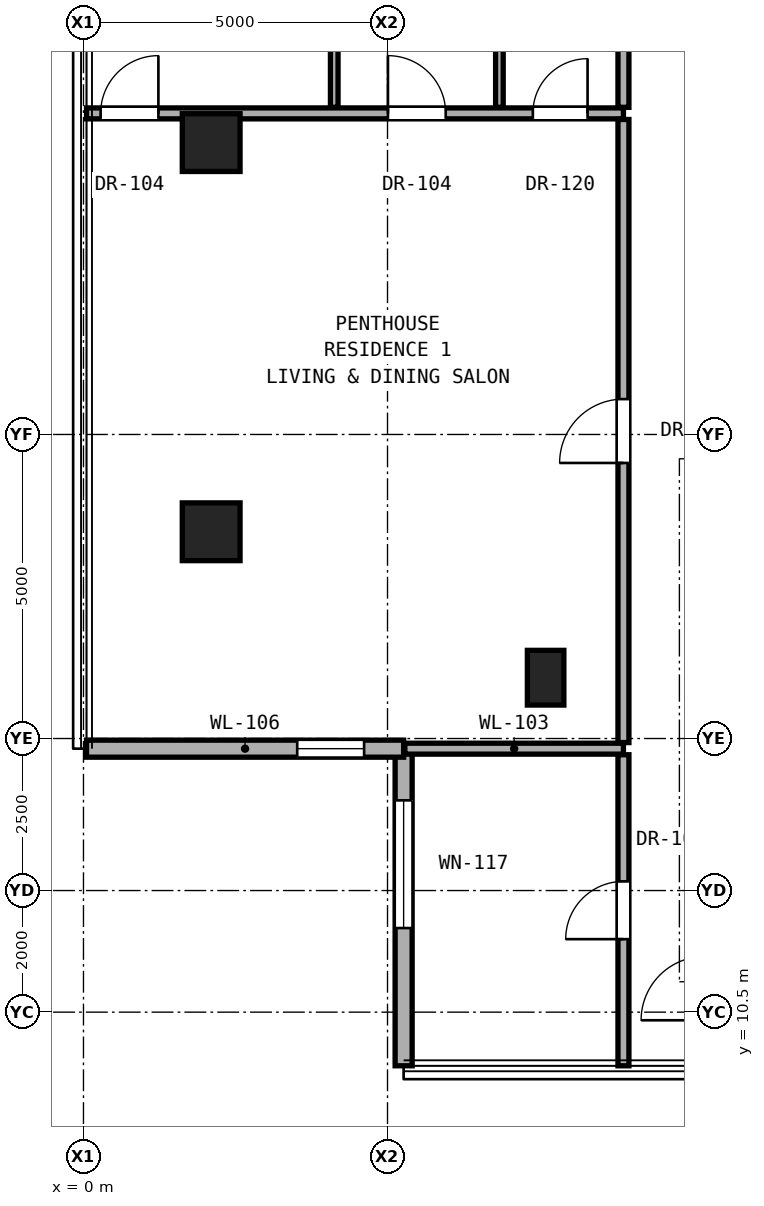
"""IFC4 building model, lengths in metres.
Left out: names, types, materials, properties, quantities, classifications, styles, units other than length and angle.
Written with IfcOpenShell. Run it as: python <this file> out.ifc"""

import sys

from ifc_helpers import new_model, si_unit, direction, frame, frame_2d, origin, origin_2d, place, context, subcontext, project, spatial, rectangle, hollow_rectangle, extrude, element, fill, save


model = new_model("IFC4")
c1 = context("Model", 3, precision=1e-05, world=origin(), true_north=direction((0.0, 1.0)))
c2 = subcontext(c1, "Body", "Model", "MODEL_VIEW")
j1 = project(units=[si_unit("LENGTHUNIT", "METRE"), si_unit("PLANEANGLEUNIT", "RADIAN")], contexts=[c1])
p1 = place(None, origin())
s1 = spatial("IfcSite", under=j1, at=p1, CompositionType="ELEMENT")
p2 = place(p1, origin())
s2 = spatial("IfcBuilding", under=s1, at=p2, CompositionType="ELEMENT")
p3 = place(p2, frame((0.0, 0.0, 196.65)))
s3 = spatial("IfcBuildingStorey", under=s2, at=p3, CompositionType="ELEMENT", Elevation=196.65)
for number, where, z_axis, x_axis in (
    (1, (2.1, 18.4, 0.0), (0.0, 0.0, 1.0), (1.0, 0.0, 0.0)),
    (2, (2.1, 24.8, 0.0), (0.0, 0.0, 1.0), (1.0, 0.0, 0.0)),
):
    element("IfcColumn", number, at=place(p3, frame(where, z_axis=z_axis, x_axis=x_axis)), inside=s3, PredefinedType="COLUMN", context=c2, shape_type="SweptSolid", body=[
        extrude(hollow_rectangle(XDim=0.95, YDim=0.95, WallThickness=0.05, at=origin_2d()), origin(), (0.0, 0.0, 1.0), 3.25),
    ])
p4 = place(p3, frame((7.6, 16.0, 0.0), z_axis=(0.0, 0.0, 1.0), x_axis=(1.0, 0.0, 0.0)))
e3 = element("IfcColumn", 3, at=p4, inside=s3, PredefinedType="PILASTER", context=c2, shape_type="SweptSolid", body=[
    extrude(rectangle(XDim=0.6, YDim=0.9, at=origin_2d()), origin(), (0.0, 0.0, 1.0), 3.25),
])
p5 = place(p3, frame((5.265, 14.833, 0.0), z_axis=(0.0, 0.0, 1.0), x_axis=(0.0, -1.0, 0.0)))
e4 = element("IfcWall", 4, at=p5, inside=s3, PredefinedType="SOLIDWALL", context=c2, shape_type="SweptSolid", body=[
    extrude(rectangle(XDim=5.215, YDim=0.28, at=frame_2d((2.607, 0.0))), origin(), (0.0, 0.0, 1.0), 3.03),
])
p6 = place(p5, frame((0.85, 0.0, 0.68)))
e5 = element("IfcOpeningElement", 5, at=p6, cuts=e4, PredefinedType="OPENING", context=c2, shape_type="SweptSolid", body=[
    extrude(rectangle(XDim=2.1, YDim=2.2, at=frame_2d((1.05, 1.1))), frame((0.0, 0.15, 0.0), z_axis=(0.0, -1.0, 0.0), x_axis=(1.0, 0.0, 0.0)), (0.0, 0.0, 1.0), 0.3),
])
p7 = place(p3, frame((0.05, 14.833, 0.0), z_axis=(0.0, 0.0, 1.0), x_axis=(1.0, 0.0, 0.0)))
e6 = element("IfcWall", 6, at=p7, inside=s3, PredefinedType="SOLIDWALL", context=c2, shape_type="SweptSolid", body=[
    extrude(rectangle(XDim=5.215, YDim=0.28, at=frame_2d((2.607, 0.0))), origin(), (0.0, 0.0, 1.0), 3.03),
])
p8 = place(p7, frame((3.465, 0.0, 0.85)))
e7 = element("IfcOpeningElement", 7, at=p8, cuts=e6, PredefinedType="OPENING", context=c2, shape_type="SweptSolid", body=[
    extrude(rectangle(XDim=1.1, YDim=2.0, at=frame_2d((0.55, 1.0))), frame((0.0, 0.15, 0.0), z_axis=(0.0, -1.0, 0.0), x_axis=(1.0, 0.0, 0.0)), (0.0, 0.0, 1.0), 0.3),
])
p9 = place(p3, frame((5.285, 14.833, 0.0), z_axis=(0.0, 0.0, 1.0), x_axis=(1.0, 0.0, 0.0)))
e8 = element("IfcWall", 8, at=p9, inside=s3, PredefinedType="PARTITIONING", context=c2, shape_type="SweptSolid", body=[
    extrude(rectangle(XDim=3.595, YDim=0.18, at=frame_2d((1.797, 0.0))), origin(), (0.0, 0.0, 1.0), 3.05),
])
p10 = place(p3, frame((0.05, 25.28, 0.0), z_axis=(0.0, 0.0, 1.0), x_axis=(1.0, 0.0, 0.0)))
e9 = element("IfcWall", 9, at=p10, inside=s3, PredefinedType="PARTITIONING", context=c2, shape_type="SweptSolid", body=[
    extrude(rectangle(XDim=8.83, YDim=0.18, at=frame_2d((4.415, 0.0))), origin(), (0.0, 0.0, 1.0), 2.269),
])
p11 = place(p10, frame((0.232, 0.0, 0.0)))
e10 = element("IfcOpeningElement", 10, at=p11, cuts=e9, PredefinedType="OPENING", context=c2, shape_type="SweptSolid", body=[
    extrude(rectangle(XDim=0.95, YDim=2.15, at=frame_2d((0.475, 1.075))), frame((0.0, 0.1, 0.0), z_axis=(0.0, -1.0, 0.0), x_axis=(1.0, 0.0, 0.0)), (0.0, 0.0, 1.0), 0.2),
])
p12 = place(p10, frame((4.957, 0.0, 0.0)))
e11 = element("IfcOpeningElement", 11, at=p12, cuts=e9, PredefinedType="OPENING", context=c2, shape_type="SweptSolid", body=[
    extrude(rectangle(XDim=0.95, YDim=2.15, at=frame_2d((0.475, 1.075))), frame((0.0, 0.1, 0.0), z_axis=(0.0, -1.0, 0.0), x_axis=(1.0, 0.0, 0.0)), (0.0, 0.0, 1.0), 0.2),
])
p13 = place(p10, frame((7.34, 0.0, 0.0)))
e12 = element("IfcOpeningElement", 12, at=p13, cuts=e9, PredefinedType="OPENING", context=c2, shape_type="SweptSolid", body=[
    extrude(rectangle(XDim=0.9, YDim=2.1, at=frame_2d((0.45, 1.05))), frame((0.0, 0.1, 0.0), z_axis=(0.0, -1.0, 0.0), x_axis=(1.0, 0.0, 0.0)), (0.0, 0.0, 1.0), 0.2),
])
for number, where, z_axis, x_axis in (
    (13, (4.124, 25.38, 0.0), (0.0, 0.0, 1.0), (0.0, 1.0, 0.0)),
    (14, (6.84, 25.38, 0.0), (0.0, 0.0, 1.0), (0.0, 1.0, 0.0)),
):
    element("IfcWall", number, at=place(p3, frame(where, z_axis=z_axis, x_axis=x_axis)), inside=s3, PredefinedType="PARTITIONING", context=c2, shape_type="SweptSolid", body=[
        extrude(rectangle(XDim=2.548, YDim=0.125, at=frame_2d((1.274, 0.0))), origin(), (0.0, 0.0, 1.0), 3.05),
    ])
p14 = place(p3, frame((8.88, 9.618, 0.0), z_axis=(0.0, 0.0, 1.0), x_axis=(0.0, 1.0, 0.0)))
e15 = element("IfcWall", 15, at=p14, inside=s3, PredefinedType="PARTITIONING", context=c2, shape_type="SweptSolid", body=[
    extrude(rectangle(XDim=5.115, YDim=0.18, at=frame_2d((2.558, 0.0))), origin(), (0.0, 0.0, 1.0), 3.05),
])
p15 = place(p14, frame((2.083, 0.0, 0.0)))
e16 = element("IfcOpeningElement", 16, at=p15, cuts=e15, PredefinedType="OPENING", context=c2, shape_type="SweptSolid", body=[
    extrude(rectangle(XDim=0.95, YDim=2.15, at=frame_2d((0.475, 1.075))), frame((0.0, 0.1, 0.0), z_axis=(0.0, -1.0, 0.0), x_axis=(1.0, 0.0, 0.0)), (0.0, 0.0, 1.0), 0.2),
])
p16 = place(p3, frame((8.88, 14.933, 0.0), z_axis=(0.0, 0.0, 1.0), x_axis=(0.0, 1.0, 0.0)))
e17 = element("IfcWall", 17, at=p16, inside=s3, PredefinedType="PARTITIONING", context=c2, shape_type="SweptSolid", body=[
    extrude(rectangle(XDim=10.247, YDim=0.18, at=frame_2d((5.124, 0.0))), origin(), (0.0, 0.0, 1.0), 2.346),
])
p17 = place(p16, frame((4.598, 0.0, 0.0)))
e18 = element("IfcOpeningElement", 18, at=p17, cuts=e17, PredefinedType="OPENING", context=c2, shape_type="SweptSolid", body=[
    extrude(rectangle(XDim=1.05, YDim=2.2, at=frame_2d((0.525, 1.1))), frame((0.0, 0.1, 0.0), z_axis=(0.0, -1.0, 0.0), x_axis=(1.0, 0.0, 0.0)), (0.0, 0.0, 1.0), 0.2),
])
p18 = place(p3, frame((8.88, 25.38, 0.0), z_axis=(0.0, 0.0, 1.0), x_axis=(0.0, 1.0, 0.0)))
e19 = element("IfcWall", 19, at=p18, inside=s3, PredefinedType="PARTITIONING", context=c2, shape_type="SweptSolid", body=[
    extrude(rectangle(XDim=2.548, YDim=0.18, at=frame_2d((1.274, 0.0))), origin(), (0.0, 0.0, 1.0), 3.05),
])
p19 = place(p6, origin())
e20 = element("IfcWindow", 20, at=p19, inside=s3, PartitioningType="SINGLE_PANEL", PredefinedType="WINDOW", context=c2, shape_type="SweptSolid", body=[
    extrude(rectangle(XDim=2.1, YDim=2.2, at=frame_2d((1.05, 1.1))), frame((0.0, 0.03, 0.0), z_axis=(0.0, -1.0, 0.0), x_axis=(1.0, 0.0, 0.0)), (0.0, 0.0, 1.0), 0.06),
])
fill(e5, e20)
p20 = place(p8, origin())
e21 = element("IfcWindow", 21, at=p20, inside=s3, PartitioningType="SINGLE_PANEL", PredefinedType="WINDOW", context=c2, shape_type="SweptSolid", body=[
    extrude(rectangle(XDim=1.1, YDim=2.0, at=frame_2d((0.55, 1.0))), frame((0.0, 0.03, 0.0), z_axis=(0.0, -1.0, 0.0), x_axis=(1.0, 0.0, 0.0)), (0.0, 0.0, 1.0), 0.06),
])
fill(e7, e21)
p21 = place(p17, origin())
e22 = element("IfcDoor", 22, at=p21, inside=s3, OperationType="SINGLE_SWING_LEFT", PredefinedType="DOOR", context=c2, shape_type="SweptSolid", body=[
    extrude(rectangle(XDim=1.05, YDim=2.2, at=frame_2d((0.525, 1.1))), frame((0.0, 0.025, 0.0), z_axis=(0.0, -1.0, 0.0), x_axis=(1.0, 0.0, 0.0)), (0.0, 0.0, 1.0), 0.05),
])
fill(e18, e22)
p22 = place(p11, origin())
e23 = element("IfcDoor", 23, at=p22, inside=s3, OperationType="SINGLE_SWING_RIGHT", PredefinedType="DOOR", context=c2, shape_type="SweptSolid", body=[
    extrude(rectangle(XDim=0.95, YDim=2.15, at=frame_2d((0.475, 1.075))), frame((0.0, 0.025, 0.0), z_axis=(0.0, -1.0, 0.0), x_axis=(1.0, 0.0, 0.0)), (0.0, 0.0, 1.0), 0.05),
])
fill(e10, e23)
p23 = place(p12, origin())
e24 = element("IfcDoor", 24, at=p23, inside=s3, OperationType="SINGLE_SWING_LEFT", PredefinedType="DOOR", context=c2, shape_type="SweptSolid", body=[
    extrude(rectangle(XDim=0.95, YDim=2.15, at=frame_2d((0.475, 1.075))), frame((0.0, 0.025, 0.0), z_axis=(0.0, -1.0, 0.0), x_axis=(1.0, 0.0, 0.0)), (0.0, 0.0, 1.0), 0.05),
])
fill(e11, e24)
p24 = place(p13, origin())
e25 = element("IfcDoor", 25, at=p24, inside=s3, OperationType="SINGLE_SWING_RIGHT", PredefinedType="DOOR", context=c2, shape_type="SweptSolid", body=[
    extrude(rectangle(XDim=0.9, YDim=2.1, at=frame_2d((0.45, 1.05))), frame((0.0, 0.025, 0.0), z_axis=(0.0, -1.0, 0.0), x_axis=(1.0, 0.0, 0.0)), (0.0, 0.0, 1.0), 0.05),
])
fill(e12, e25)
p25 = place(p15, origin())
e26 = element("IfcDoor", 26, at=p25, inside=s3, OperationType="SINGLE_SWING_LEFT", PredefinedType="DOOR", context=c2, shape_type="SweptSolid", body=[
    extrude(rectangle(XDim=0.95, YDim=2.15, at=frame_2d((0.475, 1.075))), frame((0.0, 0.025, 0.0), z_axis=(0.0, -1.0, 0.0), x_axis=(1.0, 0.0, 0.0)), (0.0, 0.0, 1.0), 0.05),
])
fill(e16, e26)
save(model, sys.argv[1])
